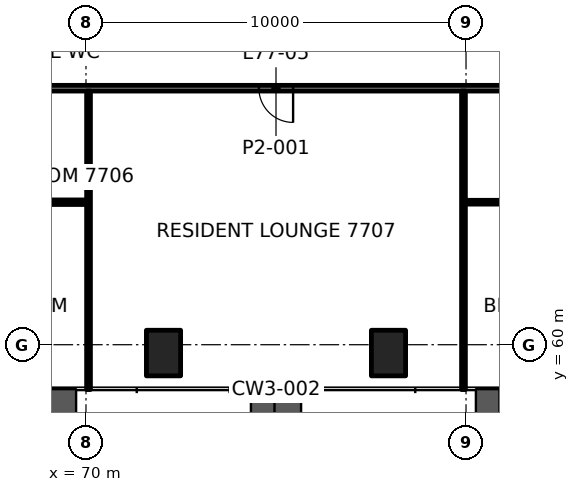
"""IFC4 building model, lengths in metres.
Left out: names, types, materials, properties, quantities, classifications, styles, units other than length and angle.
Written with IfcOpenShell. Run it as: python <this file> out.ifc"""

import sys

from ifc_helpers import new_model, si_unit, direction, frame, frame_2d, origin, origin_2d, place, context, subcontext, project, spatial, rectangle, hollow_rectangle, extrude, element, fill, save


model = new_model("IFC4")
c1 = context("Model", 3, precision=1e-05, world=origin(), true_north=direction((0.0, 1.0)))
c2 = subcontext(c1, "Body", "Model", "MODEL_VIEW")
j1 = project(units=[si_unit("LENGTHUNIT", "METRE"), si_unit("PLANEANGLEUNIT", "RADIAN")], contexts=[c1])
p1 = place(None, origin())
s1 = spatial("IfcSite", under=j1, at=p1, CompositionType="ELEMENT")
p2 = place(p1, origin())
s2 = spatial("IfcBuilding", under=s1, at=p2, CompositionType="ELEMENT")
p3 = place(p2, frame((0.0, 0.0, 316.1)))
s3 = spatial("IfcBuildingStorey", under=s2, at=p3, CompositionType="ELEMENT", Elevation=316.1)
for number, where, z_axis, x_axis in (
    (1, (72.04, 59.78, -0.0), (0.0, 0.0, 1.0), (1.0, 0.0, 0.0)),
    (2, (77.96, 59.78, -0.0), (0.0, 0.0, 1.0), (1.0, 0.0, 0.0)),
):
    element("IfcColumn", number, at=place(p3, frame(where, z_axis=z_axis, x_axis=x_axis)), inside=s3, PredefinedType="COLUMN", context=c2, shape_type="SweptSolid", body=[
        extrude(hollow_rectangle(XDim=0.9, YDim=1.2, WallThickness=0.06, at=origin_2d()), origin(), (0.0, 0.0, 1.0), 3.5),
    ])
p4 = place(p3, frame((63.434, 63.75, 0.0), z_axis=(0.0, 0.0, 1.0), x_axis=(1.0, 0.0, 0.0)))
e3 = element("IfcWall", 3, at=p4, inside=s3, PredefinedType="PARTITIONING", context=c2, shape_type="SweptSolid", body=[
    extrude(rectangle(XDim=6.582, YDim=0.12, at=frame_2d((3.291, 0.0))), origin(), (0.0, 0.0, 1.0), 2.7),
])
p5 = place(p4, frame((0.814, 0.0, 0.0)))
e4 = element("IfcOpeningElement", 4, at=p5, cuts=e3, PredefinedType="OPENING", context=c2, shape_type="SweptSolid", body=[
    extrude(rectangle(XDim=0.8, YDim=2.1, at=frame_2d((0.4, 1.05))), frame((0.0, 0.07, 0.0), z_axis=(0.0, -1.0, 0.0), x_axis=(1.0, 0.0, 0.0)), (0.0, 0.0, 1.0), 0.14),
])
p6 = place(p4, frame((4.002, 0.0, 0.0)))
e5 = element("IfcOpeningElement", 5, at=p6, cuts=e3, PredefinedType="OPENING", context=c2, shape_type="SweptSolid", body=[
    extrude(rectangle(XDim=0.9, YDim=2.1, at=frame_2d((0.45, 1.05))), frame((0.0, 0.07, 0.0), z_axis=(0.0, -1.0, 0.0), x_axis=(1.0, 0.0, 0.0)), (0.0, 0.0, 1.0), 0.14),
])
p7 = place(p3, frame((86.566, 63.75, 0.0), z_axis=(0.0, 0.0, 1.0), x_axis=(-1.0, 0.0, 0.0)))
e6 = element("IfcWall", 6, at=p7, inside=s3, PredefinedType="PARTITIONING", context=c2, shape_type="SweptSolid", body=[
    extrude(rectangle(XDim=6.582, YDim=0.1, at=frame_2d((3.291, 0.0))), origin(), (0.0, 0.0, 1.0), 2.7),
])
p8 = place(p7, frame((0.913, 0.0, 0.0)))
e7 = element("IfcOpeningElement", 7, at=p8, cuts=e6, PredefinedType="OPENING", context=c2, shape_type="SweptSolid", body=[
    extrude(rectangle(XDim=0.9, YDim=2.1, at=frame_2d((0.45, 1.05))), frame((0.0, 0.06, 0.0), z_axis=(0.0, -1.0, 0.0), x_axis=(1.0, 0.0, 0.0)), (0.0, 0.0, 1.0), 0.12),
])
p9 = place(p3, frame((85.0, 66.75, 0.0), z_axis=(0.0, 0.0, 1.0), x_axis=(-1.0, 0.0, 0.0)))
e8 = element("IfcWall", 8, at=p9, inside=s3, PredefinedType="PARTITIONING", context=c2, shape_type="SweptSolid", body=[
    extrude(rectangle(XDim=20.0, YDim=0.15, at=frame_2d((10.0, 0.0))), origin(), (0.0, 0.0, 1.0), 2.7),
])
p10 = place(p9, frame((2.135, 0.0, 0.0)))
e9 = element("IfcOpeningElement", 9, at=p10, cuts=e8, PredefinedType="OPENING", context=c2, shape_type="SweptSolid", body=[
    extrude(rectangle(XDim=1.0, YDim=2.1, at=frame_2d((0.5, 1.05))), frame((0.0, 0.085, 0.0), z_axis=(0.0, -1.0, 0.0), x_axis=(1.0, 0.0, 0.0)), (0.0, 0.0, 1.0), 0.17),
])
p11 = place(p9, frame((9.55, 0.0, 0.0)))
e10 = element("IfcOpeningElement", 10, at=p11, cuts=e8, PredefinedType="OPENING", context=c2, shape_type="SweptSolid", body=[
    extrude(rectangle(XDim=0.9, YDim=2.1, at=frame_2d((0.45, 1.05))), frame((0.0, 0.085, 0.0), z_axis=(0.0, -1.0, 0.0), x_axis=(1.0, 0.0, 0.0)), (0.0, 0.0, 1.0), 0.17),
])
for number, where, z_axis, x_axis in (
    (11, (79.933, 58.82, 0.0), (0.0, 0.0, 1.0), (0.0, 1.0, 0.0)),
    (12, (70.067, 58.82, 0.0), (0.0, 0.0, 1.0), (0.0, 1.0, 0.0)),
):
    element("IfcWall", number, at=place(p3, frame(where, z_axis=z_axis, x_axis=x_axis)), inside=s3, PredefinedType="PARTITIONING", context=c2, shape_type="SweptSolid", body=[
        extrude(rectangle(XDim=7.855, YDim=0.1, at=frame_2d((3.927, 0.0))), origin(), (0.0, 0.0, 1.0), 2.688),
    ])
p12 = place(p11, origin())
e13 = element("IfcDoor", 13, at=p12, inside=s3, OperationType="SINGLE_SWING_LEFT", PredefinedType="DOOR", context=c2, shape_type="SweptSolid", body=[
    extrude(rectangle(XDim=0.9, YDim=2.1, at=frame_2d((0.45, 1.05))), frame((0.0, 0.025, 0.0), z_axis=(0.0, -1.0, 0.0), x_axis=(1.0, 0.0, 0.0)), (0.0, 0.0, 1.0), 0.05),
])
fill(e10, e13)
save(model, sys.argv[1])
